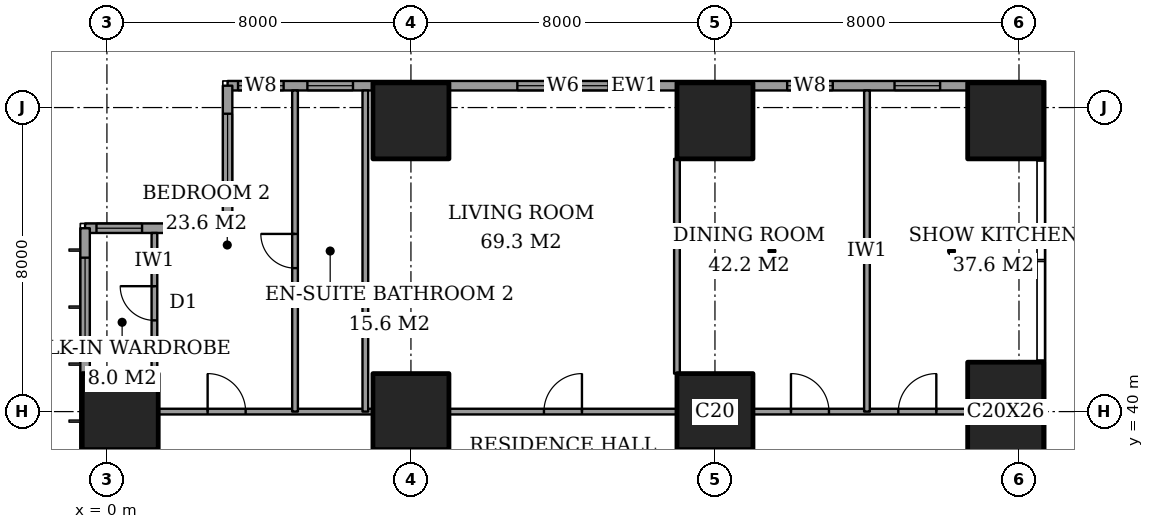
"""IFC4 building model, lengths in metres.
Left out: names, types, materials, properties, quantities, classifications, styles, units other than length and angle.
Written with IfcOpenShell. Run it as: python <this file> out.ifc"""

import sys

from ifc_helpers import new_model, si_unit, direction, frame, frame_2d, origin, origin_2d, place, context, subcontext, project, spatial, rectangle, extrude, element, fill, save


model = new_model("IFC4")
c1 = context("Model", 3, precision=1e-05, world=origin(), true_north=direction((0.0, 1.0)))
c2 = subcontext(c1, "Body", "Model", "MODEL_VIEW")
j1 = project(units=[si_unit("LENGTHUNIT", "METRE"), si_unit("PLANEANGLEUNIT", "RADIAN")], contexts=[c1])
p1 = place(None, origin())
s1 = spatial("IfcSite", under=j1, at=p1, CompositionType="ELEMENT")
p2 = place(p1, origin())
s2 = spatial("IfcBuilding", under=s1, at=p2, CompositionType="ELEMENT")
p3 = place(p2, frame((0.0, 0.0, 69.2)))
s3 = spatial("IfcBuildingStorey", under=s2, at=p3, CompositionType="ELEMENT", Elevation=69.2)
for number, where, z_axis, x_axis in (
    (1, (0.35, 40.0, 0.0), (0.0, 0.0, 1.0), (1.0, 0.0, 0.0)),
    (2, (8.0, 40.0, 0.0), (0.0, 0.0, 1.0), (1.0, 0.0, 0.0)),
    (3, (8.0, 47.65, 0.0), (0.0, 0.0, 1.0), (1.0, 0.0, 0.0)),
    (4, (16.0, 40.0, 0.0), (0.0, 0.0, 1.0), (1.0, 0.0, 0.0)),
    (5, (16.0, 47.65, 0.0), (0.0, 0.0, 1.0), (1.0, 0.0, 0.0)),
):
    element("IfcColumn", number, at=place(p3, frame(where, z_axis=z_axis, x_axis=x_axis)), inside=s3, PredefinedType="COLUMN", context=c2, shape_type="SweptSolid", body=[
        extrude(rectangle(XDim=2.0, YDim=2.0, at=origin_2d()), origin(), (0.0, 0.0, 1.0), 3.6),
    ])
p4 = place(p3, frame((23.65, 40.0, 0.0), z_axis=(0.0, 0.0, 1.0), x_axis=(1.0, 0.0, 0.0)))
e6 = element("IfcColumn", 6, at=p4, inside=s3, PredefinedType="COLUMN", context=c2, shape_type="SweptSolid", body=[
    extrude(rectangle(XDim=2.0, YDim=2.6, at=origin_2d()), origin(), (0.0, 0.0, 1.0), 3.6),
])
p5 = place(p3, frame((23.65, 47.65, 0.0), z_axis=(0.0, 0.0, 1.0), x_axis=(1.0, 0.0, 0.0)))
e7 = element("IfcColumn", 7, at=p5, inside=s3, PredefinedType="COLUMN", context=c2, shape_type="SweptSolid", body=[
    extrude(rectangle(XDim=2.0, YDim=2.0, at=origin_2d()), origin(), (0.0, 0.0, 1.0), 3.6),
])
p6 = place(p3, frame((24.575, 48.575, 0.0), z_axis=(0.0, 0.0, 1.0), x_axis=(-1.0, 0.0, 0.0)))
e8 = element("IfcWall", 8, at=p6, inside=s3, PredefinedType="SOLIDWALL", context=c2, shape_type="SweptSolid", body=[
    extrude(rectangle(XDim=21.4, YDim=0.25, at=frame_2d((10.7, 0.0))), origin(), (0.0, 0.0, 1.0), 3.6),
])
p7 = place(p6, frame((2.65, 0.0, 0.6)))
e9 = element("IfcOpeningElement", 9, at=p7, cuts=e8, PredefinedType="OPENING", context=c2, shape_type="SweptSolid", body=[
    extrude(rectangle(XDim=1.2, YDim=2.0, at=frame_2d((0.6, 1.0))), frame((0.0, 0.135, 0.0), z_axis=(0.0, -1.0, 0.0), x_axis=(1.0, 0.0, 0.0)), (0.0, 0.0, 1.0), 0.27),
])
p8 = place(p6, frame((5.475, 0.0, 0.6)))
e10 = element("IfcOpeningElement", 10, at=p8, cuts=e8, PredefinedType="OPENING", context=c2, shape_type="SweptSolid", body=[
    extrude(rectangle(XDim=1.2, YDim=2.0, at=frame_2d((0.6, 1.0))), frame((0.0, 0.135, 0.0), z_axis=(0.0, -1.0, 0.0), x_axis=(1.0, 0.0, 0.0)), (0.0, 0.0, 1.0), 0.27),
])
p9 = place(p6, frame((11.375, 0.0, 0.6)))
e11 = element("IfcOpeningElement", 11, at=p9, cuts=e8, PredefinedType="OPENING", context=c2, shape_type="SweptSolid", body=[
    extrude(rectangle(XDim=2.4, YDim=2.0, at=frame_2d((1.2, 1.0))), frame((0.0, 0.135, 0.0), z_axis=(0.0, -1.0, 0.0), x_axis=(1.0, 0.0, 0.0)), (0.0, 0.0, 1.0), 0.27),
])
p10 = place(p6, frame((18.1, 0.0, 0.6)))
e12 = element("IfcOpeningElement", 12, at=p10, cuts=e8, PredefinedType="OPENING", context=c2, shape_type="SweptSolid", body=[
    extrude(rectangle(XDim=1.2, YDim=2.0, at=frame_2d((0.6, 1.0))), frame((0.0, 0.135, 0.0), z_axis=(0.0, -1.0, 0.0), x_axis=(1.0, 0.0, 0.0)), (0.0, 0.0, 1.0), 0.27),
])
p11 = place(p6, frame((19.925, 0.0, 0.6)))
e13 = element("IfcOpeningElement", 13, at=p11, cuts=e8, PredefinedType="OPENING", context=c2, shape_type="SweptSolid", body=[
    extrude(rectangle(XDim=1.2, YDim=2.0, at=frame_2d((0.6, 1.0))), frame((0.0, 0.135, 0.0), z_axis=(0.0, -1.0, 0.0), x_axis=(1.0, 0.0, 0.0)), (0.0, 0.0, 1.0), 0.27),
])
p12 = place(p3, frame((3.175, 48.575, 0.0), z_axis=(0.0, 0.0, 1.0), x_axis=(0.0, -1.0, 0.0)))
e14 = element("IfcWall", 14, at=p12, inside=s3, PredefinedType="SOLIDWALL", context=c2, shape_type="SweptSolid", body=[
    extrude(rectangle(XDim=3.75, YDim=0.25, at=frame_2d((1.875, 0.0))), origin(), (0.0, 0.0, 1.0), 3.6),
])
p13 = place(p12, frame((0.738, 0.0, 0.6)))
e15 = element("IfcOpeningElement", 15, at=p13, cuts=e14, PredefinedType="OPENING", context=c2, shape_type="SweptSolid", body=[
    extrude(rectangle(XDim=2.4, YDim=2.0, at=frame_2d((1.2, 1.0))), frame((0.0, 0.135, 0.0), z_axis=(0.0, -1.0, 0.0), x_axis=(1.0, 0.0, 0.0)), (0.0, 0.0, 1.0), 0.27),
])
p14 = place(p3, frame((3.175, 44.825, 0.0), z_axis=(0.0, 0.0, 1.0), x_axis=(-1.0, 0.0, 0.0)))
e16 = element("IfcWall", 16, at=p14, inside=s3, PredefinedType="SOLIDWALL", context=c2, shape_type="SweptSolid", body=[
    extrude(rectangle(XDim=3.75, YDim=0.25, at=frame_2d((1.875, 0.0))), origin(), (0.0, 0.0, 1.0), 3.6),
])
p15 = place(p14, frame((0.363, 0.0, 0.6)))
e17 = element("IfcOpeningElement", 17, at=p15, cuts=e16, PredefinedType="OPENING", context=c2, shape_type="SweptSolid", body=[
    extrude(rectangle(XDim=1.2, YDim=2.0, at=frame_2d((0.6, 1.0))), frame((0.0, 0.135, 0.0), z_axis=(0.0, -1.0, 0.0), x_axis=(1.0, 0.0, 0.0)), (0.0, 0.0, 1.0), 0.27),
])
p16 = place(p14, frame((2.25, 0.0, 0.6)))
e18 = element("IfcOpeningElement", 18, at=p16, cuts=e16, PredefinedType="OPENING", context=c2, shape_type="SweptSolid", body=[
    extrude(rectangle(XDim=1.2, YDim=2.0, at=frame_2d((0.6, 1.0))), frame((0.0, 0.135, 0.0), z_axis=(0.0, -1.0, 0.0), x_axis=(1.0, 0.0, 0.0)), (0.0, 0.0, 1.0), 0.27),
])
p17 = place(p3, frame((-0.575, 44.825, 0.0), z_axis=(0.0, 0.0, 1.0), x_axis=(0.0, -1.0, 0.0)))
e19 = element("IfcWall", 19, at=p17, inside=s3, PredefinedType="SOLIDWALL", context=c2, shape_type="SweptSolid", body=[
    extrude(rectangle(XDim=41.65, YDim=0.25, at=frame_2d((20.825, 0.0))), origin(), (0.0, 0.0, 1.0), 3.6),
])
p18 = place(p17, frame((0.775, 0.0, 0.6)))
e20 = element("IfcOpeningElement", 20, at=p18, cuts=e19, PredefinedType="OPENING", context=c2, shape_type="SweptSolid", body=[
    extrude(rectangle(XDim=2.4, YDim=2.0, at=frame_2d((1.2, 1.0))), frame((0.0, 0.135, 0.0), z_axis=(0.0, -1.0, 0.0), x_axis=(1.0, 0.0, 0.0)), (0.0, 0.0, 1.0), 0.27),
])
p19 = place(p17, frame((6.1, 0.0, 0.6)))
e21 = element("IfcOpeningElement", 21, at=p19, cuts=e19, PredefinedType="OPENING", context=c2, shape_type="SweptSolid", body=[
    extrude(rectangle(XDim=1.2, YDim=2.0, at=frame_2d((0.6, 1.0))), frame((0.0, 0.135, 0.0), z_axis=(0.0, -1.0, 0.0), x_axis=(1.0, 0.0, 0.0)), (0.0, 0.0, 1.0), 0.27),
])
p20 = place(p17, frame((8.425, 0.0, 0.6)))
e22 = element("IfcOpeningElement", 22, at=p20, cuts=e19, PredefinedType="OPENING", context=c2, shape_type="SweptSolid", body=[
    extrude(rectangle(XDim=2.4, YDim=2.0, at=frame_2d((1.2, 1.0))), frame((0.0, 0.135, 0.0), z_axis=(0.0, -1.0, 0.0), x_axis=(1.0, 0.0, 0.0)), (0.0, 0.0, 1.0), 0.27),
])
p21 = place(p17, frame((15.625, 0.0, 0.6)))
e23 = element("IfcOpeningElement", 23, at=p21, cuts=e19, PredefinedType="OPENING", context=c2, shape_type="SweptSolid", body=[
    extrude(rectangle(XDim=2.4, YDim=2.0, at=frame_2d((1.2, 1.0))), frame((0.0, 0.135, 0.0), z_axis=(0.0, -1.0, 0.0), x_axis=(1.0, 0.0, 0.0)), (0.0, 0.0, 1.0), 0.27),
])
p22 = place(p17, frame((23.625, 0.0, 0.6)))
e24 = element("IfcOpeningElement", 24, at=p22, cuts=e19, PredefinedType="OPENING", context=c2, shape_type="SweptSolid", body=[
    extrude(rectangle(XDim=2.4, YDim=2.0, at=frame_2d((1.2, 1.0))), frame((0.0, 0.135, 0.0), z_axis=(0.0, -1.0, 0.0), x_axis=(1.0, 0.0, 0.0)), (0.0, 0.0, 1.0), 0.27),
])
p23 = place(p17, frame((30.625, 0.0, 0.6)))
e25 = element("IfcOpeningElement", 25, at=p23, cuts=e19, PredefinedType="OPENING", context=c2, shape_type="SweptSolid", body=[
    extrude(rectangle(XDim=2.4, YDim=2.0, at=frame_2d((1.2, 1.0))), frame((0.0, 0.135, 0.0), z_axis=(0.0, -1.0, 0.0), x_axis=(1.0, 0.0, 0.0)), (0.0, 0.0, 1.0), 0.27),
])
p24 = place(p17, frame((34.225, 0.0, 0.6)))
e26 = element("IfcOpeningElement", 26, at=p24, cuts=e19, PredefinedType="OPENING", context=c2, shape_type="SweptSolid", body=[
    extrude(rectangle(XDim=1.2, YDim=2.0, at=frame_2d((0.6, 1.0))), frame((0.0, 0.135, 0.0), z_axis=(0.0, -1.0, 0.0), x_axis=(1.0, 0.0, 0.0)), (0.0, 0.0, 1.0), 0.27),
])
p25 = place(p17, frame((38.475, 0.0, 0.6)))
e27 = element("IfcOpeningElement", 27, at=p25, cuts=e19, PredefinedType="OPENING", context=c2, shape_type="SweptSolid", body=[
    extrude(rectangle(XDim=2.4, YDim=2.0, at=frame_2d((1.2, 1.0))), frame((0.0, 0.135, 0.0), z_axis=(0.0, -1.0, 0.0), x_axis=(1.0, 0.0, 0.0)), (0.0, 0.0, 1.0), 0.27),
])
p26 = place(p3, frame((1.35, 40.0, 0.0), z_axis=(0.0, 0.0, 1.0), x_axis=(1.0, 0.0, 0.0)))
e28 = element("IfcWall", 28, at=p26, inside=s3, PredefinedType="PARTITIONING", context=c2, shape_type="SweptSolid", body=[
    extrude(rectangle(XDim=5.65, YDim=0.15, at=frame_2d((2.825, 0.0))), origin(), (0.0, 0.0, 1.0), 3.35),
])
p27 = place(p26, frame((1.3, 0.0, 0.0)))
e29 = element("IfcOpeningElement", 29, at=p27, cuts=e28, PredefinedType="OPENING", context=c2, shape_type="SweptSolid", body=[
    extrude(rectangle(XDim=1.0, YDim=2.1, at=frame_2d((0.5, 1.05))), frame((0.0, 0.085, 0.0), z_axis=(0.0, -1.0, 0.0), x_axis=(1.0, 0.0, 0.0)), (0.0, 0.0, 1.0), 0.17),
])
p28 = place(p3, frame((9.0, 40.0, 0.0), z_axis=(0.0, 0.0, 1.0), x_axis=(1.0, 0.0, 0.0)))
e30 = element("IfcWall", 30, at=p28, inside=s3, PredefinedType="PARTITIONING", context=c2, shape_type="SweptSolid", body=[
    extrude(rectangle(XDim=6.0, YDim=0.15, at=frame_2d((3.0, 0.0))), origin(), (0.0, 0.0, 1.0), 3.35),
])
p29 = place(p28, frame((2.5, 0.0, 0.0)))
e31 = element("IfcOpeningElement", 31, at=p29, cuts=e30, PredefinedType="OPENING", context=c2, shape_type="SweptSolid", body=[
    extrude(rectangle(XDim=1.0, YDim=2.1, at=frame_2d((0.5, 1.05))), frame((0.0, 0.085, 0.0), z_axis=(0.0, -1.0, 0.0), x_axis=(1.0, 0.0, 0.0)), (0.0, 0.0, 1.0), 0.17),
])
p30 = place(p3, frame((17.0, 40.0, 0.0), z_axis=(0.0, 0.0, 1.0), x_axis=(1.0, 0.0, 0.0)))
e32 = element("IfcWall", 32, at=p30, inside=s3, PredefinedType="PARTITIONING", context=c2, shape_type="SweptSolid", body=[
    extrude(rectangle(XDim=5.65, YDim=0.15, at=frame_2d((2.825, 0.0))), origin(), (0.0, 0.0, 1.0), 3.35),
])
p31 = place(p30, frame((1.0, 0.0, 0.0)))
e33 = element("IfcOpeningElement", 33, at=p31, cuts=e32, PredefinedType="OPENING", context=c2, shape_type="SweptSolid", body=[
    extrude(rectangle(XDim=1.0, YDim=2.1, at=frame_2d((0.5, 1.05))), frame((0.0, 0.085, 0.0), z_axis=(0.0, -1.0, 0.0), x_axis=(1.0, 0.0, 0.0)), (0.0, 0.0, 1.0), 0.17),
])
p32 = place(p30, frame((3.825, 0.0, 0.0)))
e34 = element("IfcOpeningElement", 34, at=p32, cuts=e32, PredefinedType="OPENING", context=c2, shape_type="SweptSolid", body=[
    extrude(rectangle(XDim=1.0, YDim=2.1, at=frame_2d((0.5, 1.05))), frame((0.0, 0.085, 0.0), z_axis=(0.0, -1.0, 0.0), x_axis=(1.0, 0.0, 0.0)), (0.0, 0.0, 1.0), 0.17),
])
p33 = place(p3, frame((1.25, 41.0, 0.0), z_axis=(0.0, 0.0, 1.0), x_axis=(0.0, 1.0, 0.0)))
e35 = element("IfcWall", 35, at=p33, inside=s3, PredefinedType="PARTITIONING", context=c2, shape_type="SweptSolid", body=[
    extrude(rectangle(XDim=3.7, YDim=0.15, at=frame_2d((1.85, 0.0))), origin(), (0.0, 0.0, 1.0), 3.35),
])
p34 = place(p33, frame((1.4, 0.0, 0.0)))
e36 = element("IfcOpeningElement", 36, at=p34, cuts=e35, PredefinedType="OPENING", context=c2, shape_type="SweptSolid", body=[
    extrude(rectangle(XDim=0.9, YDim=2.1, at=frame_2d((0.45, 1.05))), frame((0.0, 0.085, 0.0), z_axis=(0.0, -1.0, 0.0), x_axis=(1.0, 0.0, 0.0)), (0.0, 0.0, 1.0), 0.17),
])
p35 = place(p3, frame((4.95, 40.0, 0.0), z_axis=(0.0, 0.0, 1.0), x_axis=(0.0, 1.0, 0.0)))
e37 = element("IfcWall", 37, at=p35, inside=s3, PredefinedType="PARTITIONING", context=c2, shape_type="SweptSolid", body=[
    extrude(rectangle(XDim=8.45, YDim=0.15, at=frame_2d((4.225, 0.0))), origin(), (0.0, 0.0, 1.0), 3.35),
])
p36 = place(p35, frame((3.775, 0.0, 0.0)))
e38 = element("IfcOpeningElement", 38, at=p36, cuts=e37, PredefinedType="OPENING", context=c2, shape_type="SweptSolid", body=[
    extrude(rectangle(XDim=0.9, YDim=2.1, at=frame_2d((0.45, 1.05))), frame((0.0, 0.085, 0.0), z_axis=(0.0, -1.0, 0.0), x_axis=(1.0, 0.0, 0.0)), (0.0, 0.0, 1.0), 0.17),
])
p37 = place(p3, frame((6.8, 40.0, 0.0), z_axis=(0.0, 0.0, 1.0), x_axis=(0.0, 1.0, 0.0)))
e39 = element("IfcWall", 39, at=p37, inside=s3, PredefinedType="PARTITIONING", context=c2, shape_type="SweptSolid", body=[
    extrude(rectangle(XDim=8.45, YDim=0.15, at=frame_2d((4.225, 0.0))), origin(), (0.0, 0.0, 1.0), 3.35),
])
p38 = place(p3, frame((15.0, 41.0, 0.0), z_axis=(0.0, 0.0, 1.0), x_axis=(0.0, 1.0, 0.0)))
e40 = element("IfcWall", 40, at=p38, inside=s3, PredefinedType="PARTITIONING", context=c2, shape_type="SweptSolid", body=[
    extrude(rectangle(XDim=5.65, YDim=0.15, at=frame_2d((2.825, 0.0))), origin(), (0.0, 0.0, 1.0), 3.35),
])
p39 = place(p3, frame((20.0, 40.0, 0.0), z_axis=(0.0, 0.0, 1.0), x_axis=(0.0, 1.0, 0.0)))
e41 = element("IfcWall", 41, at=p39, inside=s3, PredefinedType="PARTITIONING", context=c2, shape_type="SweptSolid", body=[
    extrude(rectangle(XDim=8.45, YDim=0.15, at=frame_2d((4.225, 0.0))), origin(), (0.0, 0.0, 1.0), 3.35),
])
p40 = place(p7, origin())
e42 = element("IfcWindow", 42, at=p40, inside=s3, PartitioningType="SINGLE_PANEL", PredefinedType="WINDOW", context=c2, shape_type="SweptSolid", body=[
    extrude(rectangle(XDim=1.2, YDim=2.0, at=frame_2d((0.6, 1.0))), frame((0.0, 0.03, 0.0), z_axis=(0.0, -1.0, 0.0), x_axis=(1.0, 0.0, 0.0)), (0.0, 0.0, 1.0), 0.06),
])
fill(e9, e42)
p41 = place(p8, origin())
e43 = element("IfcWindow", 43, at=p41, inside=s3, PartitioningType="SINGLE_PANEL", PredefinedType="WINDOW", context=c2, shape_type="SweptSolid", body=[
    extrude(rectangle(XDim=1.2, YDim=2.0, at=frame_2d((0.6, 1.0))), frame((0.0, 0.03, 0.0), z_axis=(0.0, -1.0, 0.0), x_axis=(1.0, 0.0, 0.0)), (0.0, 0.0, 1.0), 0.06),
])
fill(e10, e43)
p42 = place(p9, origin())
e44 = element("IfcWindow", 44, at=p42, inside=s3, PartitioningType="SINGLE_PANEL", PredefinedType="WINDOW", context=c2, shape_type="SweptSolid", body=[
    extrude(rectangle(XDim=2.4, YDim=2.0, at=frame_2d((1.2, 1.0))), frame((0.0, 0.03, 0.0), z_axis=(0.0, -1.0, 0.0), x_axis=(1.0, 0.0, 0.0)), (0.0, 0.0, 1.0), 0.06),
])
fill(e11, e44)
p43 = place(p10, origin())
e45 = element("IfcWindow", 45, at=p43, inside=s3, PartitioningType="SINGLE_PANEL", PredefinedType="WINDOW", context=c2, shape_type="SweptSolid", body=[
    extrude(rectangle(XDim=1.2, YDim=2.0, at=frame_2d((0.6, 1.0))), frame((0.0, 0.03, 0.0), z_axis=(0.0, -1.0, 0.0), x_axis=(1.0, 0.0, 0.0)), (0.0, 0.0, 1.0), 0.06),
])
fill(e12, e45)
p44 = place(p11, origin())
e46 = element("IfcWindow", 46, at=p44, inside=s3, PartitioningType="SINGLE_PANEL", PredefinedType="WINDOW", context=c2, shape_type="SweptSolid", body=[
    extrude(rectangle(XDim=1.2, YDim=2.0, at=frame_2d((0.6, 1.0))), frame((0.0, 0.03, 0.0), z_axis=(0.0, -1.0, 0.0), x_axis=(1.0, 0.0, 0.0)), (0.0, 0.0, 1.0), 0.06),
])
fill(e13, e46)
p45 = place(p13, origin())
e47 = element("IfcWindow", 47, at=p45, inside=s3, PartitioningType="SINGLE_PANEL", PredefinedType="WINDOW", context=c2, shape_type="SweptSolid", body=[
    extrude(rectangle(XDim=2.4, YDim=2.0, at=frame_2d((1.2, 1.0))), frame((0.0, 0.03, 0.0), z_axis=(0.0, -1.0, 0.0), x_axis=(1.0, 0.0, 0.0)), (0.0, 0.0, 1.0), 0.06),
])
fill(e15, e47)
p46 = place(p15, origin())
e48 = element("IfcWindow", 48, at=p46, inside=s3, PartitioningType="SINGLE_PANEL", PredefinedType="WINDOW", context=c2, shape_type="SweptSolid", body=[
    extrude(rectangle(XDim=1.2, YDim=2.0, at=frame_2d((0.6, 1.0))), frame((0.0, 0.03, 0.0), z_axis=(0.0, -1.0, 0.0), x_axis=(1.0, 0.0, 0.0)), (0.0, 0.0, 1.0), 0.06),
])
fill(e17, e48)
p47 = place(p16, origin())
e49 = element("IfcWindow", 49, at=p47, inside=s3, PartitioningType="SINGLE_PANEL", PredefinedType="WINDOW", context=c2, shape_type="SweptSolid", body=[
    extrude(rectangle(XDim=1.2, YDim=2.0, at=frame_2d((0.6, 1.0))), frame((0.0, 0.03, 0.0), z_axis=(0.0, -1.0, 0.0), x_axis=(1.0, 0.0, 0.0)), (0.0, 0.0, 1.0), 0.06),
])
fill(e18, e49)
p48 = place(p18, origin())
e50 = element("IfcWindow", 50, at=p48, inside=s3, PartitioningType="SINGLE_PANEL", PredefinedType="WINDOW", context=c2, shape_type="SweptSolid", body=[
    extrude(rectangle(XDim=2.4, YDim=2.0, at=frame_2d((1.2, 1.0))), frame((0.0, 0.03, 0.0), z_axis=(0.0, -1.0, 0.0), x_axis=(1.0, 0.0, 0.0)), (0.0, 0.0, 1.0), 0.06),
])
fill(e20, e50)
p49 = place(p34, origin())
e51 = element("IfcDoor", 51, at=p49, inside=s3, OperationType="SINGLE_SWING_LEFT", PredefinedType="DOOR", context=c2, shape_type="SweptSolid", body=[
    extrude(rectangle(XDim=0.9, YDim=2.1, at=frame_2d((0.45, 1.05))), frame((0.0, 0.025, 0.0), z_axis=(0.0, -1.0, 0.0), x_axis=(1.0, 0.0, 0.0)), (0.0, 0.0, 1.0), 0.05),
])
fill(e36, e51)
p50 = place(p27, origin())
e52 = element("IfcDoor", 52, at=p50, inside=s3, OperationType="SINGLE_SWING_RIGHT", PredefinedType="DOOR", context=c2, shape_type="SweptSolid", body=[
    extrude(rectangle(XDim=1.0, YDim=2.1, at=frame_2d((0.5, 1.05))), frame((0.0, 0.025, 0.0), z_axis=(0.0, -1.0, 0.0), x_axis=(1.0, 0.0, 0.0)), (0.0, 0.0, 1.0), 0.05),
])
fill(e29, e52)
p51 = place(p36, origin())
e53 = element("IfcDoor", 53, at=p51, inside=s3, OperationType="SINGLE_SWING_LEFT", PredefinedType="DOOR", context=c2, shape_type="SweptSolid", body=[
    extrude(rectangle(XDim=0.9, YDim=2.1, at=frame_2d((0.45, 1.05))), frame((0.0, 0.025, 0.0), z_axis=(0.0, -1.0, 0.0), x_axis=(1.0, 0.0, 0.0)), (0.0, 0.0, 1.0), 0.05),
])
fill(e38, e53)
p52 = place(p29, origin())
e54 = element("IfcDoor", 54, at=p52, inside=s3, OperationType="SINGLE_SWING_LEFT", PredefinedType="DOOR", context=c2, shape_type="SweptSolid", body=[
    extrude(rectangle(XDim=1.0, YDim=2.1, at=frame_2d((0.5, 1.05))), frame((0.0, 0.025, 0.0), z_axis=(0.0, -1.0, 0.0), x_axis=(1.0, 0.0, 0.0)), (0.0, 0.0, 1.0), 0.05),
])
fill(e31, e54)
p53 = place(p31, origin())
e55 = element("IfcDoor", 55, at=p53, inside=s3, OperationType="SINGLE_SWING_RIGHT", PredefinedType="DOOR", context=c2, shape_type="SweptSolid", body=[
    extrude(rectangle(XDim=1.0, YDim=2.1, at=frame_2d((0.5, 1.05))), frame((0.0, 0.025, 0.0), z_axis=(0.0, -1.0, 0.0), x_axis=(1.0, 0.0, 0.0)), (0.0, 0.0, 1.0), 0.05),
])
fill(e33, e55)
p54 = place(p32, origin())
e56 = element("IfcDoor", 56, at=p54, inside=s3, OperationType="SINGLE_SWING_LEFT", PredefinedType="DOOR", context=c2, shape_type="SweptSolid", body=[
    extrude(rectangle(XDim=1.0, YDim=2.1, at=frame_2d((0.5, 1.05))), frame((0.0, 0.025, 0.0), z_axis=(0.0, -1.0, 0.0), x_axis=(1.0, 0.0, 0.0)), (0.0, 0.0, 1.0), 0.05),
])
fill(e34, e56)
save(model, sys.argv[1])
